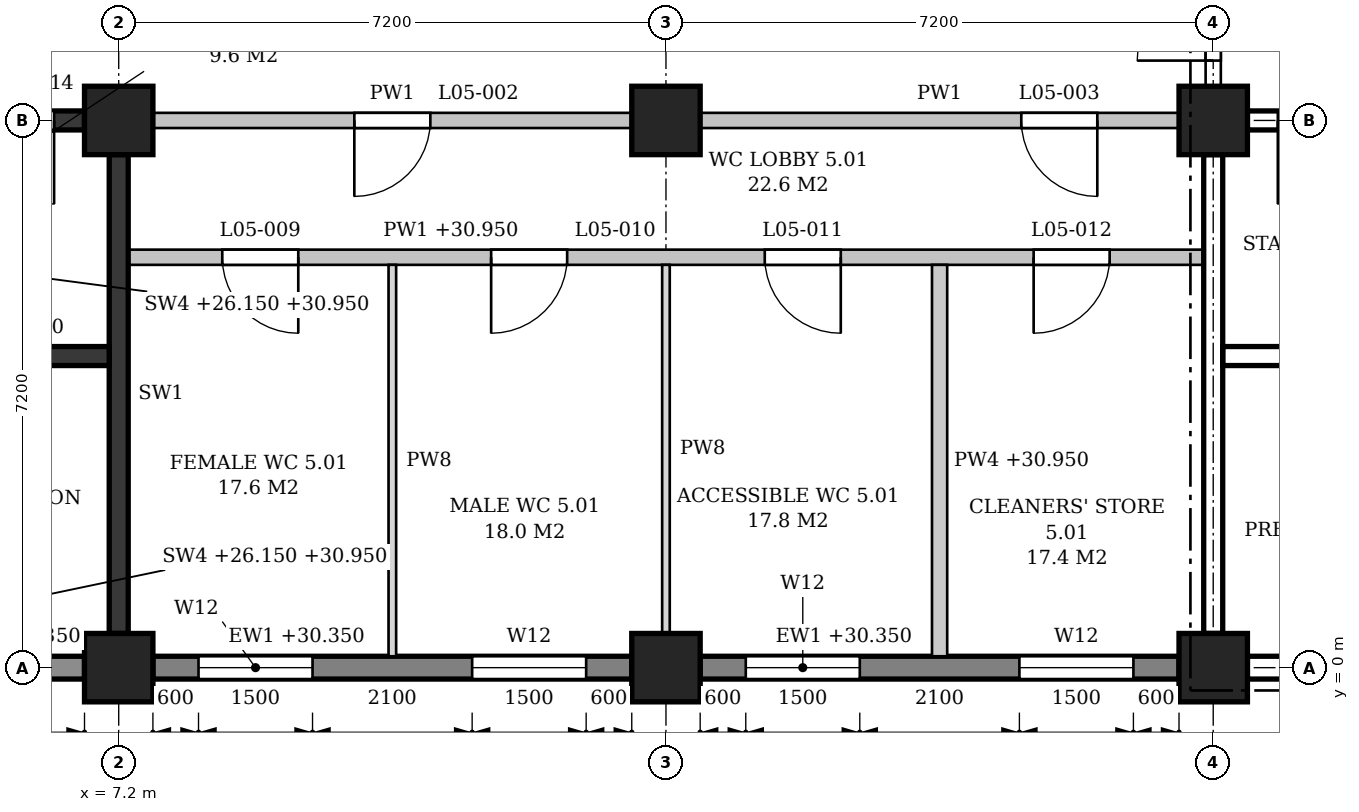
"""IFC4 building model, lengths in metres.
Left out: names, types, materials, properties, quantities, classifications, styles, units other than length and angle.
Written with IfcOpenShell. Run it as: python <this file> out.ifc"""

import sys

from ifc_helpers import new_model, si_unit, direction, frame, frame_2d, origin, origin_2d, place, context, subcontext, project, spatial, polyline, rectangle, outline, extrude, element, fill, save


model = new_model("IFC4")
c1 = context("Model", 3, precision=1e-05, world=origin(), true_north=direction((0.0, 1.0)))
c2 = subcontext(c1, "Body", "Model", "MODEL_VIEW")
j1 = project(units=[si_unit("LENGTHUNIT", "METRE"), si_unit("PLANEANGLEUNIT", "RADIAN")], contexts=[c1])
p1 = place(None, origin())
s1 = spatial("IfcSite", under=j1, at=p1, CompositionType="ELEMENT")
p2 = place(p1, origin())
s2 = spatial("IfcBuilding", under=s1, at=p2, CompositionType="ELEMENT")
p3 = place(p2, frame((0.0, 0.0, 26.4)))
s3 = spatial("IfcBuildingStorey", under=s2, at=p3, CompositionType="ELEMENT", Elevation=26.4)
for number, where, z_axis, x_axis in (
    (1, (7.2, 0.0, 0.0), (0.0, 0.0, 1.0), (1.0, 0.0, 0.0)),
    (2, (7.2, 7.2, 0.0), (0.0, 0.0, 1.0), (1.0, 0.0, 0.0)),
    (3, (14.4, 0.0, 0.0), (0.0, 0.0, 1.0), (1.0, 0.0, 0.0)),
    (4, (14.4, 7.2, 0.0), (0.0, 0.0, 1.0), (1.0, 0.0, 0.0)),
    (5, (21.6, 0.0, 0.0), (0.0, 0.0, 1.0), (1.0, 0.0, 0.0)),
    (6, (21.6, 7.2, 0.0), (0.0, 0.0, 1.0), (1.0, 0.0, 0.0)),
):
    element("IfcColumn", number, at=place(p3, frame(where, z_axis=z_axis, x_axis=x_axis)), inside=s3, PredefinedType="COLUMN", context=c2, shape_type="SweptSolid", body=[
        extrude(rectangle(XDim=0.9, YDim=0.9, at=origin_2d()), origin(), (0.0, 0.0, 1.0), 4.8),
    ])
p4 = place(p3, frame((0.45, 0.0, 0.0), z_axis=(0.0, 0.0, 1.0), x_axis=(1.0, 0.0, 0.0)))
e7 = element("IfcWall", 7, at=p4, inside=s3, PredefinedType="STANDARD", context=c2, shape_type="SweptSolid", body=[
    extrude(rectangle(XDim=6.3, YDim=0.3, at=frame_2d((3.15, 0.0))), origin(), (0.0, 0.0, 1.0), 3.95),
])
p5 = place(p4, frame((0.9, 0.0, 0.9)))
e8 = element("IfcOpeningElement", 8, at=p5, cuts=e7, PredefinedType="OPENING", context=c2, shape_type="SweptSolid", body=[
    extrude(outline(polyline([(0.0, 0.0), (0.9, 0.0), (0.9, 2.05), (0.45, 2.5), (0.0, 2.05), (0.0, 0.0)])), frame((0.0, 0.16, 0.0), z_axis=(0.0, -1.0, 0.0), x_axis=(1.0, 0.0, 0.0)), (0.0, 0.0, 1.0), 0.32),
])
p6 = place(p3, frame((7.65, 0.0, 0.0), z_axis=(0.0, 0.0, 1.0), x_axis=(1.0, 0.0, 0.0)))
e9 = element("IfcWall", 9, at=p6, inside=s3, PredefinedType="STANDARD", context=c2, shape_type="SweptSolid", body=[
    extrude(rectangle(XDim=6.3, YDim=0.3, at=frame_2d((3.15, 0.0))), origin(), (0.0, 0.0, 1.0), 3.95),
])
p7 = place(p6, frame((0.6, 0.0, 0.9)))
e10 = element("IfcOpeningElement", 10, at=p7, cuts=e9, PredefinedType="OPENING", context=c2, shape_type="SweptSolid", body=[
    extrude(outline(polyline([(0.0, 0.0), (1.5, 0.0), (1.5, 1.75), (0.75, 2.5), (0.0, 1.75), (0.0, 0.0)])), frame((0.0, 0.16, 0.0), z_axis=(0.0, -1.0, 0.0), x_axis=(1.0, 0.0, 0.0)), (0.0, 0.0, 1.0), 0.32),
])
p8 = place(p6, frame((4.2, 0.0, 0.9)))
e11 = element("IfcOpeningElement", 11, at=p8, cuts=e9, PredefinedType="OPENING", context=c2, shape_type="SweptSolid", body=[
    extrude(outline(polyline([(0.0, 0.0), (1.5, 0.0), (1.5, 1.75), (0.75, 2.5), (0.0, 1.75), (0.0, 0.0)])), frame((0.0, 0.16, 0.0), z_axis=(0.0, -1.0, 0.0), x_axis=(1.0, 0.0, 0.0)), (0.0, 0.0, 1.0), 0.32),
])
p9 = place(p3, frame((14.85, 0.0, 0.0), z_axis=(0.0, 0.0, 1.0), x_axis=(1.0, 0.0, 0.0)))
e12 = element("IfcWall", 12, at=p9, inside=s3, PredefinedType="STANDARD", context=c2, shape_type="SweptSolid", body=[
    extrude(rectangle(XDim=6.3, YDim=0.3, at=frame_2d((3.15, 0.0))), origin(), (0.0, 0.0, 1.0), 3.95),
])
p10 = place(p9, frame((0.6, 0.0, 0.9)))
e13 = element("IfcOpeningElement", 13, at=p10, cuts=e12, PredefinedType="OPENING", context=c2, shape_type="SweptSolid", body=[
    extrude(outline(polyline([(0.0, 0.0), (1.5, 0.0), (1.5, 1.75), (0.75, 2.5), (0.0, 1.75), (0.0, 0.0)])), frame((0.0, 0.16, 0.0), z_axis=(0.0, -1.0, 0.0), x_axis=(1.0, 0.0, 0.0)), (0.0, 0.0, 1.0), 0.32),
])
p11 = place(p9, frame((4.2, 0.0, 0.9)))
e14 = element("IfcOpeningElement", 14, at=p11, cuts=e12, PredefinedType="OPENING", context=c2, shape_type="SweptSolid", body=[
    extrude(outline(polyline([(0.0, 0.0), (1.5, 0.0), (1.5, 1.75), (0.75, 2.5), (0.0, 1.75), (0.0, 0.0)])), frame((0.0, 0.16, 0.0), z_axis=(0.0, -1.0, 0.0), x_axis=(1.0, 0.0, 0.0)), (0.0, 0.0, 1.0), 0.32),
])
p12 = place(p3, frame((22.05, 0.0, 0.0), z_axis=(0.0, 0.0, 1.0), x_axis=(1.0, 0.0, 0.0)))
e15 = element("IfcWall", 15, at=p12, inside=s3, PredefinedType="STANDARD", context=c2, shape_type="SweptSolid", body=[
    extrude(rectangle(XDim=6.3, YDim=0.3, at=frame_2d((3.15, 0.0))), origin(), (0.0, 0.0, 1.0), 3.95),
])
p13 = place(p12, frame((4.5, 0.0, 0.9)))
e16 = element("IfcOpeningElement", 16, at=p13, cuts=e15, PredefinedType="OPENING", context=c2, shape_type="SweptSolid", body=[
    extrude(outline(polyline([(0.0, 0.0), (0.9, 0.0), (0.9, 2.05), (0.45, 2.5), (0.0, 2.05), (0.0, 0.0)])), frame((0.0, 0.16, 0.0), z_axis=(0.0, -1.0, 0.0), x_axis=(1.0, 0.0, 0.0)), (0.0, 0.0, 1.0), 0.32),
])
p14 = place(p3, frame((0.45, 7.2, 0.0), z_axis=(0.0, 0.0, 1.0), x_axis=(1.0, 0.0, 0.0)))
e17 = element("IfcWall", 17, at=p14, inside=s3, PredefinedType="SHEAR", context=c2, shape_type="SweptSolid", body=[
    extrude(rectangle(XDim=6.3, YDim=0.25, at=frame_2d((3.15, 0.0))), origin(), (0.0, 0.0, 1.0), 3.8),
])
p15 = place(p14, frame((4.8, 0.0, 0.0)))
e18 = element("IfcOpeningElement", 18, at=p15, cuts=e17, PredefinedType="OPENING", context=c2, shape_type="SweptSolid", body=[
    extrude(rectangle(XDim=1.1, YDim=2.1, at=frame_2d((0.55, 1.05))), frame((0.0, 0.135, 0.0), z_axis=(0.0, -1.0, 0.0), x_axis=(1.0, 0.0, 0.0)), (0.0, 0.0, 1.0), 0.27),
])
p16 = place(p3, frame((7.2, 0.45, 0.0), z_axis=(0.0, 0.0, 1.0), x_axis=(0.0, 1.0, 0.0)))
e19 = element("IfcWall", 19, at=p16, inside=s3, PredefinedType="SHEAR", context=c2, shape_type="SweptSolid", body=[
    extrude(rectangle(XDim=6.3, YDim=0.25, at=frame_2d((3.15, 0.0))), origin(), (0.0, 0.0, 1.0), 3.8),
])
p17 = place(p3, frame((4.1, 4.1, 0.0), z_axis=(0.0, 0.0, 1.0), x_axis=(1.0, 0.0, 0.0)))
e20 = element("IfcWall", 20, at=p17, inside=s3, PredefinedType="SHEAR", context=c2, shape_type="SweptSolid", body=[
    extrude(rectangle(XDim=2.975, YDim=0.25, at=frame_2d((1.487, 0.0))), origin(), (0.0, 0.0, 1.0), 4.55),
])
p18 = place(p17, frame((0.55, 0.0, 0.0)))
e21 = element("IfcOpeningElement", 21, at=p18, cuts=e20, PredefinedType="OPENING", context=c2, shape_type="SweptSolid", body=[
    extrude(rectangle(XDim=0.9, YDim=2.1, at=frame_2d((0.45, 1.05))), frame((0.0, 0.135, 0.0), z_axis=(0.0, -1.0, 0.0), x_axis=(1.0, 0.0, 0.0)), (0.0, 0.0, 1.0), 0.27),
])
p19 = place(p3, frame((22.05, 7.2, 0.0), z_axis=(0.0, 0.0, 1.0), x_axis=(1.0, 0.0, 0.0)))
e22 = element("IfcWall", 22, at=p19, inside=s3, PredefinedType="SHEAR", context=c2, shape_type="SweptSolid", body=[
    extrude(rectangle(XDim=6.3, YDim=0.25, at=frame_2d((3.15, 0.0))), origin(), (0.0, 0.0, 1.0), 3.8),
])
p20 = place(p19, frame((0.4, 0.0, 0.0)))
e23 = element("IfcOpeningElement", 23, at=p20, cuts=e22, PredefinedType="OPENING", context=c2, shape_type="SweptSolid", body=[
    extrude(rectangle(XDim=1.1, YDim=2.1, at=frame_2d((0.55, 1.05))), frame((0.0, 0.135, 0.0), z_axis=(0.0, -1.0, 0.0), x_axis=(1.0, 0.0, 0.0)), (0.0, 0.0, 1.0), 0.27),
])
p21 = place(p3, frame((21.6, 0.45, 0.0), z_axis=(0.0, 0.0, 1.0), x_axis=(0.0, 1.0, 0.0)))
e24 = element("IfcWall", 24, at=p21, inside=s3, PredefinedType="SHEAR", context=c2, shape_type="SweptSolid", body=[
    extrude(rectangle(XDim=6.3, YDim=0.25, at=frame_2d((3.15, 0.0))), origin(), (0.0, 0.0, 1.0), 3.8),
])
p22 = place(p3, frame((21.725, 4.1, 0.0), z_axis=(0.0, 0.0, 1.0), x_axis=(1.0, 0.0, 0.0)))
e25 = element("IfcWall", 25, at=p22, inside=s3, PredefinedType="SHEAR", context=c2, shape_type="SweptSolid", body=[
    extrude(rectangle(XDim=2.975, YDim=0.25, at=frame_2d((1.487, 0.0))), origin(), (0.0, 0.0, 1.0), 4.55),
])
p23 = place(p22, frame((1.525, 0.0, 0.0)))
e26 = element("IfcOpeningElement", 26, at=p23, cuts=e25, PredefinedType="OPENING", context=c2, shape_type="SweptSolid", body=[
    extrude(rectangle(XDim=0.9, YDim=2.1, at=frame_2d((0.45, 1.05))), frame((0.0, 0.135, 0.0), z_axis=(0.0, -1.0, 0.0), x_axis=(1.0, 0.0, 0.0)), (0.0, 0.0, 1.0), 0.27),
])
p24 = place(p3, frame((7.325, 5.4, 0.0), z_axis=(0.0, 0.0, 1.0), x_axis=(1.0, 0.0, 0.0)))
e27 = element("IfcWall", 27, at=p24, inside=s3, PredefinedType="PARTITIONING", context=c2, shape_type="SweptSolid", body=[
    extrude(outline(polyline([(0.0, 0.0), (14.15, 0.0), (14.15, 3.8), (14.025, 3.8), (14.025, 4.55), (7.325, 4.55), (7.325, 3.8), (6.825, 3.8), (6.825, 4.55), (0.125, 4.55), (0.125, 3.8), (0.0, 3.8), (0.0, 0.0)])), frame((0.0, 0.1, 0.0), z_axis=(0.0, -1.0, 0.0), x_axis=(1.0, 0.0, 0.0)), (0.0, 0.0, 1.0), 0.2),
])
p25 = place(p24, frame((1.238, 0.0, 0.0)))
e28 = element("IfcOpeningElement", 28, at=p25, cuts=e27, PredefinedType="OPENING", context=c2, shape_type="SweptSolid", body=[
    extrude(rectangle(XDim=1.0, YDim=2.1, at=frame_2d((0.5, 1.05))), frame((0.0, 0.11, 0.0), z_axis=(0.0, -1.0, 0.0), x_axis=(1.0, 0.0, 0.0)), (0.0, 0.0, 1.0), 0.22),
])
p26 = place(p24, frame((4.775, 0.0, 0.0)))
e29 = element("IfcOpeningElement", 29, at=p26, cuts=e27, PredefinedType="OPENING", context=c2, shape_type="SweptSolid", body=[
    extrude(rectangle(XDim=1.0, YDim=2.1, at=frame_2d((0.5, 1.05))), frame((0.0, 0.11, 0.0), z_axis=(0.0, -1.0, 0.0), x_axis=(1.0, 0.0, 0.0)), (0.0, 0.0, 1.0), 0.22),
])
p27 = place(p24, frame((8.375, 0.0, 0.0)))
e30 = element("IfcOpeningElement", 30, at=p27, cuts=e27, PredefinedType="OPENING", context=c2, shape_type="SweptSolid", body=[
    extrude(rectangle(XDim=1.0, YDim=2.1, at=frame_2d((0.5, 1.05))), frame((0.0, 0.11, 0.0), z_axis=(0.0, -1.0, 0.0), x_axis=(1.0, 0.0, 0.0)), (0.0, 0.0, 1.0), 0.22),
])
p28 = place(p24, frame((11.913, 0.0, 0.0)))
e31 = element("IfcOpeningElement", 31, at=p28, cuts=e27, PredefinedType="OPENING", context=c2, shape_type="SweptSolid", body=[
    extrude(rectangle(XDim=1.0, YDim=2.1, at=frame_2d((0.5, 1.05))), frame((0.0, 0.11, 0.0), z_axis=(0.0, -1.0, 0.0), x_axis=(1.0, 0.0, 0.0)), (0.0, 0.0, 1.0), 0.22),
])
p29 = place(p3, frame((7.65, 7.2, 0.0), z_axis=(0.0, 0.0, 1.0), x_axis=(1.0, 0.0, 0.0)))
e32 = element("IfcWall", 32, at=p29, inside=s3, PredefinedType="PARTITIONING", context=c2, shape_type="SweptSolid", body=[
    extrude(rectangle(XDim=6.3, YDim=0.2, at=frame_2d((3.15, 0.0))), origin(), (0.0, 0.0, 1.0), 3.8),
])
p30 = place(p29, frame((2.65, 0.0, 0.0)))
e33 = element("IfcOpeningElement", 33, at=p30, cuts=e32, PredefinedType="OPENING", context=c2, shape_type="SweptSolid", body=[
    extrude(rectangle(XDim=1.0, YDim=2.1, at=frame_2d((0.5, 1.05))), frame((0.0, 0.11, 0.0), z_axis=(0.0, -1.0, 0.0), x_axis=(1.0, 0.0, 0.0)), (0.0, 0.0, 1.0), 0.22),
])
p31 = place(p3, frame((14.85, 7.2, 0.0), z_axis=(0.0, 0.0, 1.0), x_axis=(1.0, 0.0, 0.0)))
e34 = element("IfcWall", 34, at=p31, inside=s3, PredefinedType="PARTITIONING", context=c2, shape_type="SweptSolid", body=[
    extrude(rectangle(XDim=6.3, YDim=0.2, at=frame_2d((3.15, 0.0))), origin(), (0.0, 0.0, 1.0), 3.8),
])
p32 = place(p31, frame((4.225, 0.0, 0.0)))
e35 = element("IfcOpeningElement", 35, at=p32, cuts=e34, PredefinedType="OPENING", context=c2, shape_type="SweptSolid", body=[
    extrude(rectangle(XDim=1.0, YDim=2.1, at=frame_2d((0.5, 1.05))), frame((0.0, 0.11, 0.0), z_axis=(0.0, -1.0, 0.0), x_axis=(1.0, 0.0, 0.0)), (0.0, 0.0, 1.0), 0.22),
])
p33 = place(p3, frame((10.8, 0.15, 0.0), z_axis=(0.0, 0.0, 1.0), x_axis=(0.0, 1.0, 0.0)))
e36 = element("IfcWall", 36, at=p33, inside=s3, PredefinedType="PARTITIONING", context=c2, shape_type="SweptSolid", body=[
    extrude(rectangle(XDim=5.15, YDim=0.1, at=frame_2d((2.575, 0.0))), origin(), (0.0, 0.0, 1.0), 3.8),
])
p34 = place(p3, frame((14.4, 0.45, 0.0), z_axis=(0.0, 0.0, 1.0), x_axis=(0.0, 1.0, 0.0)))
e37 = element("IfcWall", 37, at=p34, inside=s3, PredefinedType="PARTITIONING", context=c2, shape_type="SweptSolid", body=[
    extrude(rectangle(XDim=4.85, YDim=0.1, at=frame_2d((2.425, 0.0))), origin(), (0.0, 0.0, 1.0), 3.8),
])
p35 = place(p3, frame((18.0, 0.15, 0.0), z_axis=(0.0, 0.0, 1.0), x_axis=(0.0, 1.0, 0.0)))
e38 = element("IfcWall", 38, at=p35, inside=s3, PredefinedType="PARTITIONING", context=c2, shape_type="SweptSolid", body=[
    extrude(outline(polyline([(0.0, 0.0), (5.15, 0.0), (5.15, 4.55), (0.1, 4.55), (0.1, 3.95), (0.0, 3.95), (0.0, 0.0)])), frame((0.0, 0.1, 0.0), z_axis=(0.0, -1.0, 0.0), x_axis=(1.0, 0.0, 0.0)), (0.0, 0.0, 1.0), 0.2),
])
p36 = place(p3, frame((21.6, 7.65, 0.0), z_axis=(0.0, 0.0, 1.0), x_axis=(0.0, 1.0, 0.0)))
e39 = element("IfcWall", 39, at=p36, inside=s3, PredefinedType="PARTITIONING", context=c2, shape_type="SweptSolid", body=[
    extrude(rectangle(XDim=2.675, YDim=0.2, at=frame_2d((1.337, 0.0))), origin(), (0.0, 0.0, 1.0), 3.8),
])
p37 = place(p36, frame((0.337, 0.0, 0.0)))
e40 = element("IfcOpeningElement", 40, at=p37, cuts=e39, PredefinedType="OPENING", context=c2, shape_type="SweptSolid", body=[
    extrude(rectangle(XDim=2.0, YDim=2.4, at=frame_2d((1.0, 1.2))), frame((0.0, 0.11, 0.0), z_axis=(0.0, -1.0, 0.0), x_axis=(1.0, 0.0, 0.0)), (0.0, 0.0, 1.0), 0.22),
])
p38 = place(p7, origin())
e41 = element("IfcWindow", 41, at=p38, inside=s3, PartitioningType="SINGLE_PANEL", PredefinedType="WINDOW", context=c2, shape_type="SweptSolid", body=[
    extrude(outline(polyline([(0.0, 0.0), (1.5, 0.0), (1.5, 1.75), (0.75, 2.5), (0.0, 1.75), (0.0, 0.0)])), frame((0.0, 0.03, 0.0), z_axis=(0.0, -1.0, 0.0), x_axis=(1.0, 0.0, 0.0)), (0.0, 0.0, 1.0), 0.06),
])
fill(e10, e41)
p39 = place(p8, origin())
e42 = element("IfcWindow", 42, at=p39, inside=s3, PartitioningType="SINGLE_PANEL", PredefinedType="WINDOW", context=c2, shape_type="SweptSolid", body=[
    extrude(outline(polyline([(0.0, 0.0), (1.5, 0.0), (1.5, 1.75), (0.75, 2.5), (0.0, 1.75), (0.0, 0.0)])), frame((0.0, 0.03, 0.0), z_axis=(0.0, -1.0, 0.0), x_axis=(1.0, 0.0, 0.0)), (0.0, 0.0, 1.0), 0.06),
])
fill(e11, e42)
p40 = place(p10, origin())
e43 = element("IfcWindow", 43, at=p40, inside=s3, PartitioningType="SINGLE_PANEL", PredefinedType="WINDOW", context=c2, shape_type="SweptSolid", body=[
    extrude(outline(polyline([(0.0, 0.0), (1.5, 0.0), (1.5, 1.75), (0.75, 2.5), (0.0, 1.75), (0.0, 0.0)])), frame((0.0, 0.03, 0.0), z_axis=(0.0, -1.0, 0.0), x_axis=(1.0, 0.0, 0.0)), (0.0, 0.0, 1.0), 0.06),
])
fill(e13, e43)
p41 = place(p11, origin())
e44 = element("IfcWindow", 44, at=p41, inside=s3, PartitioningType="SINGLE_PANEL", PredefinedType="WINDOW", context=c2, shape_type="SweptSolid", body=[
    extrude(outline(polyline([(0.0, 0.0), (1.5, 0.0), (1.5, 1.75), (0.75, 2.5), (0.0, 1.75), (0.0, 0.0)])), frame((0.0, 0.03, 0.0), z_axis=(0.0, -1.0, 0.0), x_axis=(1.0, 0.0, 0.0)), (0.0, 0.0, 1.0), 0.06),
])
fill(e14, e44)
p42 = place(p15, frame((1.1, 0.0, 0.0), z_axis=(0.0, 0.0, 1.0), x_axis=(-1.0, 0.0, 0.0)))
e45 = element("IfcDoor", 45, at=p42, inside=s3, OperationType="SINGLE_SWING_LEFT", PredefinedType="DOOR", context=c2, shape_type="SweptSolid", body=[
    extrude(rectangle(XDim=1.1, YDim=2.1, at=frame_2d((0.55, 1.05))), frame((0.0, 0.025, 0.0), z_axis=(0.0, -1.0, 0.0), x_axis=(1.0, 0.0, 0.0)), (0.0, 0.0, 1.0), 0.05),
])
fill(e18, e45)
p43 = place(p20, frame((1.1, 0.0, 0.0), z_axis=(0.0, 0.0, 1.0), x_axis=(-1.0, 0.0, 0.0)))
e46 = element("IfcDoor", 46, at=p43, inside=s3, OperationType="SINGLE_SWING_RIGHT", PredefinedType="DOOR", context=c2, shape_type="SweptSolid", body=[
    extrude(rectangle(XDim=1.1, YDim=2.1, at=frame_2d((0.55, 1.05))), frame((0.0, 0.025, 0.0), z_axis=(0.0, -1.0, 0.0), x_axis=(1.0, 0.0, 0.0)), (0.0, 0.0, 1.0), 0.05),
])
fill(e23, e46)
p44 = place(p37, origin())
e47 = element("IfcDoor", 47, at=p44, inside=s3, OperationType="DOUBLE_DOOR_SINGLE_SWING", PredefinedType="DOOR", context=c2, shape_type="SweptSolid", body=[
    extrude(rectangle(XDim=2.0, YDim=2.4, at=frame_2d((1.0, 1.2))), frame((0.0, 0.025, 0.0), z_axis=(0.0, -1.0, 0.0), x_axis=(1.0, 0.0, 0.0)), (0.0, 0.0, 1.0), 0.05),
])
fill(e40, e47)
p45 = place(p30, frame((1.0, 0.0, 0.0), z_axis=(0.0, 0.0, 1.0), x_axis=(-1.0, 0.0, 0.0)))
e48 = element("IfcDoor", 48, at=p45, inside=s3, OperationType="SINGLE_SWING_RIGHT", PredefinedType="DOOR", context=c2, shape_type="SweptSolid", body=[
    extrude(rectangle(XDim=1.0, YDim=2.1, at=frame_2d((0.5, 1.05))), frame((0.0, 0.025, 0.0), z_axis=(0.0, -1.0, 0.0), x_axis=(1.0, 0.0, 0.0)), (0.0, 0.0, 1.0), 0.05),
])
fill(e33, e48)
p46 = place(p32, frame((1.0, 0.0, 0.0), z_axis=(0.0, 0.0, 1.0), x_axis=(-1.0, 0.0, 0.0)))
e49 = element("IfcDoor", 49, at=p46, inside=s3, OperationType="SINGLE_SWING_LEFT", PredefinedType="DOOR", context=c2, shape_type="SweptSolid", body=[
    extrude(rectangle(XDim=1.0, YDim=2.1, at=frame_2d((0.5, 1.05))), frame((0.0, 0.025, 0.0), z_axis=(0.0, -1.0, 0.0), x_axis=(1.0, 0.0, 0.0)), (0.0, 0.0, 1.0), 0.05),
])
fill(e35, e49)
p47 = place(p25, frame((1.0, 0.0, 0.0), z_axis=(0.0, 0.0, 1.0), x_axis=(-1.0, 0.0, 0.0)))
e50 = element("IfcDoor", 50, at=p47, inside=s3, OperationType="SINGLE_SWING_LEFT", PredefinedType="DOOR", context=c2, shape_type="SweptSolid", body=[
    extrude(rectangle(XDim=1.0, YDim=2.1, at=frame_2d((0.5, 1.05))), frame((0.0, 0.025, 0.0), z_axis=(0.0, -1.0, 0.0), x_axis=(1.0, 0.0, 0.0)), (0.0, 0.0, 1.0), 0.05),
])
fill(e28, e50)
p48 = place(p26, frame((1.0, 0.0, 0.0), z_axis=(0.0, 0.0, 1.0), x_axis=(-1.0, 0.0, 0.0)))
e51 = element("IfcDoor", 51, at=p48, inside=s3, OperationType="SINGLE_SWING_RIGHT", PredefinedType="DOOR", context=c2, shape_type="SweptSolid", body=[
    extrude(rectangle(XDim=1.0, YDim=2.1, at=frame_2d((0.5, 1.05))), frame((0.0, 0.025, 0.0), z_axis=(0.0, -1.0, 0.0), x_axis=(1.0, 0.0, 0.0)), (0.0, 0.0, 1.0), 0.05),
])
fill(e29, e51)
p49 = place(p27, frame((1.0, 0.0, 0.0), z_axis=(0.0, 0.0, 1.0), x_axis=(-1.0, 0.0, 0.0)))
e52 = element("IfcDoor", 52, at=p49, inside=s3, OperationType="SINGLE_SWING_LEFT", PredefinedType="DOOR", context=c2, shape_type="SweptSolid", body=[
    extrude(rectangle(XDim=1.0, YDim=2.1, at=frame_2d((0.5, 1.05))), frame((0.0, 0.025, 0.0), z_axis=(0.0, -1.0, 0.0), x_axis=(1.0, 0.0, 0.0)), (0.0, 0.0, 1.0), 0.05),
])
fill(e30, e52)
p50 = place(p28, frame((1.0, 0.0, 0.0), z_axis=(0.0, 0.0, 1.0), x_axis=(-1.0, 0.0, 0.0)))
e53 = element("IfcDoor", 53, at=p50, inside=s3, OperationType="SINGLE_SWING_RIGHT", PredefinedType="DOOR", context=c2, shape_type="SweptSolid", body=[
    extrude(rectangle(XDim=1.0, YDim=2.1, at=frame_2d((0.5, 1.05))), frame((0.0, 0.025, 0.0), z_axis=(0.0, -1.0, 0.0), x_axis=(1.0, 0.0, 0.0)), (0.0, 0.0, 1.0), 0.05),
])
fill(e31, e53)
save(model, sys.argv[1])
